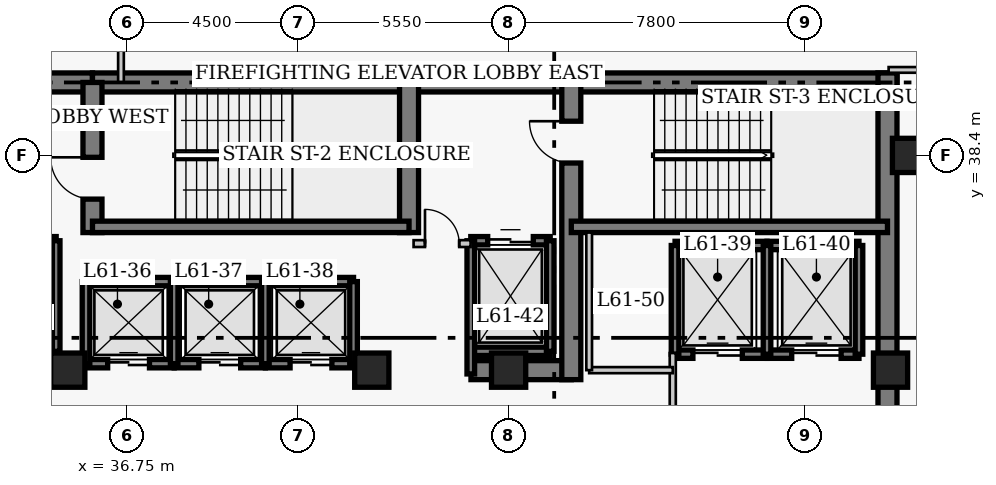
"""IFC4 building model, lengths in metres.
Left out: names, types, materials, properties, quantities, classifications, styles, units other than length and angle.
Written with IfcOpenShell. Run it as: python <this file> out.ifc"""

import sys

from ifc_helpers import new_model, si_unit, direction, frame, frame_2d, origin, origin_2d, place, context, subcontext, project, spatial, rectangle, extrude, element, fill, save


model = new_model("IFC4")
c1 = context("Model", 3, precision=1e-05, world=origin(), true_north=direction((0.0, 1.0)))
c2 = subcontext(c1, "Body", "Model", "MODEL_VIEW")
j1 = project(units=[si_unit("LENGTHUNIT", "METRE"), si_unit("PLANEANGLEUNIT", "RADIAN")], contexts=[c1])
p1 = place(None, origin())
s1 = spatial("IfcSite", under=j1, at=p1, CompositionType="ELEMENT")
p2 = place(p1, origin())
s2 = spatial("IfcBuilding", under=s1, at=p2, CompositionType="ELEMENT")
p3 = place(p2, frame((0.0, 0.0, 245.4)))
s3 = spatial("IfcBuildingStorey", under=s2, at=p3, CompositionType="ELEMENT", Elevation=245.4)
p4 = place(p3, frame((21.65, 40.32, 0.0), z_axis=(0.0, 0.0, 1.0), x_axis=(1.0, 0.0, 0.0)))
e1 = element("IfcWall", 1, at=p4, inside=s3, PredefinedType="SHEAR", context=c2, shape_type="SweptSolid", body=[
    extrude(rectangle(XDim=14.2, YDim=0.5, at=frame_2d((7.1, 0.0))), origin(), (0.0, 0.0, 1.0), 4.0),
])
p5 = place(p3, frame((35.85, 40.32, 0.0), z_axis=(0.0, 0.0, 1.0), x_axis=(1.0, 0.0, 0.0)))
e2 = element("IfcWall", 2, at=p5, inside=s3, PredefinedType="SHEAR", context=c2, shape_type="SweptSolid", body=[
    extrude(rectangle(XDim=12.6, YDim=0.5, at=frame_2d((6.3, 0.0))), origin(), (0.0, 0.0, 1.0), 4.0),
])
p6 = place(p3, frame((48.45, 40.32, 0.0), z_axis=(0.0, 0.0, 1.0), x_axis=(1.0, 0.0, 0.0)))
e3 = element("IfcWall", 3, at=p6, inside=s3, PredefinedType="SHEAR", context=c2, shape_type="SweptSolid", body=[
    extrude(rectangle(XDim=8.57, YDim=0.5, at=frame_2d((4.285, 0.0))), origin(), (0.0, 0.0, 1.0), 4.0),
])
p7 = place(p3, frame((56.77, 27.05, 0.0), z_axis=(0.0, 0.0, 1.0), x_axis=(0.0, 1.0, 0.0)))
e4 = element("IfcWall", 4, at=p7, inside=s3, PredefinedType="SHEAR", context=c2, shape_type="SweptSolid", body=[
    extrude(rectangle(XDim=13.52, YDim=0.5, at=frame_2d((6.76, 0.0))), origin(), (0.0, 0.0, 1.0), 4.0),
])
p8 = place(p3, frame((45.81, 32.75, 0.0), z_axis=(0.0, 0.0, 1.0), x_axis=(1.0, 0.0, 0.0)))
e5 = element("IfcWall", 5, at=p8, inside=s3, PredefinedType="SHEAR", context=c2, shape_type="SweptSolid", body=[
    extrude(rectangle(XDim=2.64, YDim=0.5, at=frame_2d((1.32, 0.0))), origin(), (0.0, 0.0, 1.0), 4.0),
])
p9 = place(p3, frame((35.85, 36.37, 0.0), z_axis=(0.0, 0.0, 1.0), x_axis=(0.0, 1.0, 0.0)))
e6 = element("IfcWall", 6, at=p9, inside=s3, PredefinedType="SHEAR", context=c2, shape_type="SweptSolid", body=[
    extrude(rectangle(XDim=3.95, YDim=0.5, at=frame_2d((1.975, 0.0))), origin(), (0.0, 0.0, 1.0), 4.0),
])
p10 = place(p9, frame((0.88, 0.0, 0.0)))
e7 = element("IfcOpeningElement", 7, at=p10, cuts=e6, PredefinedType="OPENING", context=c2, shape_type="SweptSolid", body=[
    extrude(rectangle(XDim=1.1, YDim=2.15, at=frame_2d((0.55, 1.075))), frame((0.0, 0.26, 0.0), z_axis=(0.0, -1.0, 0.0), x_axis=(1.0, 0.0, 0.0)), (0.0, 0.0, 1.0), 0.52),
])
p11 = place(p3, frame((44.18, 36.37, 0.0), z_axis=(0.0, 0.0, 1.0), x_axis=(0.0, 1.0, 0.0)))
e8 = element("IfcWall", 8, at=p11, inside=s3, PredefinedType="SHEAR", context=c2, shape_type="SweptSolid", body=[
    extrude(rectangle(XDim=3.95, YDim=0.5, at=frame_2d((1.975, 0.0))), origin(), (0.0, 0.0, 1.0), 4.0),
])
p12 = place(p3, frame((48.45, 32.5, 0.0), z_axis=(0.0, 0.0, 1.0), x_axis=(0.0, 1.0, 0.0)))
e9 = element("IfcWall", 9, at=p12, inside=s3, PredefinedType="SHEAR", context=c2, shape_type="SweptSolid", body=[
    extrude(rectangle(XDim=7.82, YDim=0.5, at=frame_2d((3.91, 0.0))), origin(), (0.0, 0.0, 1.0), 4.0),
])
p13 = place(p12, frame((5.7, 0.0, 0.0)))
e10 = element("IfcOpeningElement", 10, at=p13, cuts=e9, PredefinedType="OPENING", context=c2, shape_type="SweptSolid", body=[
    extrude(rectangle(XDim=1.1, YDim=2.15, at=frame_2d((0.55, 1.075))), frame((0.0, 0.26, 0.0), z_axis=(0.0, -1.0, 0.0), x_axis=(1.0, 0.0, 0.0)), (0.0, 0.0, 1.0), 0.52),
])
p14 = place(p3, frame((35.85, 36.52, 0.0), z_axis=(0.0, 0.0, 1.0), x_axis=(1.0, 0.0, 0.0)))
e11 = element("IfcWall", 11, at=p14, inside=s3, PredefinedType="SHEAR", context=c2, shape_type="SweptSolid", body=[
    extrude(rectangle(XDim=8.33, YDim=0.3, at=frame_2d((4.165, 0.0))), origin(), (0.0, 0.0, 1.0), 4.0),
])
p15 = place(p3, frame((48.45, 36.52, 0.0), z_axis=(0.0, 0.0, 1.0), x_axis=(1.0, 0.0, 0.0)))
e12 = element("IfcWall", 12, at=p15, inside=s3, PredefinedType="SHEAR", context=c2, shape_type="SweptSolid", body=[
    extrude(rectangle(XDim=8.32, YDim=0.3, at=frame_2d((4.16, 0.0))), origin(), (0.0, 0.0, 1.0), 4.0),
])
for number, where, z_axis, x_axis in (
    (13, (57.35, 38.4, 0.0), (0.0, 0.0, 1.0), (1.0, 0.0, 0.0)),
    (14, (35.2, 32.75, 0.0), (0.0, 0.0, 1.0), (1.0, 0.0, 0.0)),
    (15, (43.2, 32.75, 0.0), (0.0, 0.0, 1.0), (1.0, 0.0, 0.0)),
    (16, (46.8, 32.75, 0.0), (0.0, 0.0, 1.0), (1.0, 0.0, 0.0)),
    (17, (56.85, 32.75, 0.0), (0.0, 0.0, 1.0), (1.0, 0.0, 0.0)),
):
    element("IfcColumn", number, at=place(p3, frame(where, z_axis=z_axis, x_axis=x_axis)), inside=s3, PredefinedType="COLUMN", context=c2, shape_type="SweptSolid", body=[
        extrude(rectangle(XDim=0.9, YDim=0.9, at=origin_2d()), origin(), (0.0, 0.0, 1.0), 4.0),
    ])
p16 = place(p3, frame((35.68, 35.08, 0.0), z_axis=(0.0, 0.0, 1.0), x_axis=(1.0, 0.0, 0.0)))
e18 = element("IfcWall", 18, at=p16, inside=s3, PredefinedType="SHEAR", context=c2, shape_type="SweptSolid", body=[
    extrude(rectangle(XDim=2.32, YDim=0.22, at=frame_2d((1.16, 0.0))), origin(), (0.0, 0.0, 1.0), 4.0),
])
p17 = place(p3, frame((35.68, 32.92, 0.0), z_axis=(0.0, 0.0, 1.0), x_axis=(1.0, 0.0, 0.0)))
e19 = element("IfcWall", 19, at=p17, inside=s3, PredefinedType="SHEAR", context=c2, shape_type="SweptSolid", body=[
    extrude(rectangle(XDim=2.32, YDim=0.22, at=frame_2d((1.16, 0.0))), origin(), (0.0, 0.0, 1.0), 4.0),
])
p18 = place(p17, frame((0.57, 0.0, 0.0)))
e20 = element("IfcOpeningElement", 20, at=p18, cuts=e19, PredefinedType="OPENING", context=c2, shape_type="SweptSolid", body=[
    extrude(rectangle(XDim=1.1, YDim=2.15, at=frame_2d((0.55, 1.075))), frame((0.0, 0.12, 0.0), z_axis=(0.0, -1.0, 0.0), x_axis=(1.0, 0.0, 0.0)), (0.0, 0.0, 1.0), 0.24),
])
p19 = place(p3, frame((35.68, 32.92, 0.0), z_axis=(0.0, 0.0, 1.0), x_axis=(0.0, 1.0, 0.0)))
e21 = element("IfcWall", 21, at=p19, inside=s3, PredefinedType="SHEAR", context=c2, shape_type="SweptSolid", body=[
    extrude(rectangle(XDim=2.16, YDim=0.2, at=frame_2d((1.08, 0.0))), origin(), (0.0, 0.0, 1.0), 4.0),
])
p20 = place(p3, frame((38.0, 35.08, 0.0), z_axis=(0.0, 0.0, 1.0), x_axis=(1.0, 0.0, 0.0)))
e22 = element("IfcWall", 22, at=p20, inside=s3, PredefinedType="SHEAR", context=c2, shape_type="SweptSolid", body=[
    extrude(rectangle(XDim=2.4, YDim=0.22, at=frame_2d((1.2, 0.0))), origin(), (0.0, 0.0, 1.0), 4.0),
])
p21 = place(p3, frame((38.0, 32.92, 0.0), z_axis=(0.0, 0.0, 1.0), x_axis=(1.0, 0.0, 0.0)))
e23 = element("IfcWall", 23, at=p21, inside=s3, PredefinedType="SHEAR", context=c2, shape_type="SweptSolid", body=[
    extrude(rectangle(XDim=2.4, YDim=0.22, at=frame_2d((1.2, 0.0))), origin(), (0.0, 0.0, 1.0), 4.0),
])
p22 = place(p21, frame((0.65, 0.0, 0.0)))
e24 = element("IfcOpeningElement", 24, at=p22, cuts=e23, PredefinedType="OPENING", context=c2, shape_type="SweptSolid", body=[
    extrude(rectangle(XDim=1.1, YDim=2.15, at=frame_2d((0.55, 1.075))), frame((0.0, 0.12, 0.0), z_axis=(0.0, -1.0, 0.0), x_axis=(1.0, 0.0, 0.0)), (0.0, 0.0, 1.0), 0.24),
])
p23 = place(p3, frame((38.0, 32.92, 0.0), z_axis=(0.0, 0.0, 1.0), x_axis=(0.0, 1.0, 0.0)))
e25 = element("IfcWall", 25, at=p23, inside=s3, PredefinedType="SHEAR", context=c2, shape_type="SweptSolid", body=[
    extrude(rectangle(XDim=2.16, YDim=0.2, at=frame_2d((1.08, 0.0))), origin(), (0.0, 0.0, 1.0), 4.0),
])
p24 = place(p3, frame((40.4, 35.08, 0.0), z_axis=(0.0, 0.0, 1.0), x_axis=(1.0, 0.0, 0.0)))
e26 = element("IfcWall", 26, at=p24, inside=s3, PredefinedType="SHEAR", context=c2, shape_type="SweptSolid", body=[
    extrude(rectangle(XDim=2.32, YDim=0.22, at=frame_2d((1.16, 0.0))), origin(), (0.0, 0.0, 1.0), 4.0),
])
p25 = place(p3, frame((40.4, 32.92, 0.0), z_axis=(0.0, 0.0, 1.0), x_axis=(1.0, 0.0, 0.0)))
e27 = element("IfcWall", 27, at=p25, inside=s3, PredefinedType="SHEAR", context=c2, shape_type="SweptSolid", body=[
    extrude(rectangle(XDim=2.32, YDim=0.22, at=frame_2d((1.16, 0.0))), origin(), (0.0, 0.0, 1.0), 4.0),
])
p26 = place(p25, frame((0.65, 0.0, 0.0)))
e28 = element("IfcOpeningElement", 28, at=p26, cuts=e27, PredefinedType="OPENING", context=c2, shape_type="SweptSolid", body=[
    extrude(rectangle(XDim=1.1, YDim=2.15, at=frame_2d((0.55, 1.075))), frame((0.0, 0.12, 0.0), z_axis=(0.0, -1.0, 0.0), x_axis=(1.0, 0.0, 0.0)), (0.0, 0.0, 1.0), 0.24),
])
for number, where, z_axis, x_axis in (
    (29, (40.4, 32.92, 0.0), (0.0, 0.0, 1.0), (0.0, 1.0, 0.0)),
    (30, (42.72, 32.92, 0.0), (0.0, 0.0, 1.0), (0.0, 1.0, 0.0)),
):
    element("IfcWall", number, at=place(p3, frame(where, z_axis=z_axis, x_axis=x_axis)), inside=s3, PredefinedType="SHEAR", context=c2, shape_type="SweptSolid", body=[
        extrude(rectangle(XDim=2.16, YDim=0.2, at=frame_2d((1.08, 0.0))), origin(), (0.0, 0.0, 1.0), 4.0),
    ])
p27 = place(p3, frame((51.18, 36.03, 0.0), z_axis=(0.0, 0.0, 1.0), x_axis=(1.0, 0.0, 0.0)))
e31 = element("IfcWall", 31, at=p27, inside=s3, PredefinedType="SHEAR", context=c2, shape_type="SweptSolid", body=[
    extrude(rectangle(XDim=2.42, YDim=0.22, at=frame_2d((1.21, 0.0))), origin(), (0.0, 0.0, 1.0), 4.0),
])
p28 = place(p3, frame((51.18, 33.17, 0.0), z_axis=(0.0, 0.0, 1.0), x_axis=(1.0, 0.0, 0.0)))
e32 = element("IfcWall", 32, at=p28, inside=s3, PredefinedType="SHEAR", context=c2, shape_type="SweptSolid", body=[
    extrude(rectangle(XDim=2.42, YDim=0.22, at=frame_2d((1.21, 0.0))), origin(), (0.0, 0.0, 1.0), 4.0),
])
p29 = place(p28, frame((0.47, 0.0, 0.0)))
e33 = element("IfcOpeningElement", 33, at=p29, cuts=e32, PredefinedType="OPENING", context=c2, shape_type="SweptSolid", body=[
    extrude(rectangle(XDim=1.3, YDim=2.15, at=frame_2d((0.65, 1.075))), frame((0.0, 0.12, 0.0), z_axis=(0.0, -1.0, 0.0), x_axis=(1.0, 0.0, 0.0)), (0.0, 0.0, 1.0), 0.24),
])
p30 = place(p3, frame((51.18, 33.17, 0.0), z_axis=(0.0, 0.0, 1.0), x_axis=(0.0, 1.0, 0.0)))
e34 = element("IfcWall", 34, at=p30, inside=s3, PredefinedType="SHEAR", context=c2, shape_type="SweptSolid", body=[
    extrude(rectangle(XDim=2.86, YDim=0.2, at=frame_2d((1.43, 0.0))), origin(), (0.0, 0.0, 1.0), 4.0),
])
p31 = place(p3, frame((53.6, 36.03, 0.0), z_axis=(0.0, 0.0, 1.0), x_axis=(1.0, 0.0, 0.0)))
e35 = element("IfcWall", 35, at=p31, inside=s3, PredefinedType="SHEAR", context=c2, shape_type="SweptSolid", body=[
    extrude(rectangle(XDim=2.42, YDim=0.22, at=frame_2d((1.21, 0.0))), origin(), (0.0, 0.0, 1.0), 4.0),
])
p32 = place(p3, frame((53.6, 33.17, 0.0), z_axis=(0.0, 0.0, 1.0), x_axis=(1.0, 0.0, 0.0)))
e36 = element("IfcWall", 36, at=p32, inside=s3, PredefinedType="SHEAR", context=c2, shape_type="SweptSolid", body=[
    extrude(rectangle(XDim=2.42, YDim=0.22, at=frame_2d((1.21, 0.0))), origin(), (0.0, 0.0, 1.0), 4.0),
])
p33 = place(p32, frame((0.65, 0.0, 0.0)))
e37 = element("IfcOpeningElement", 37, at=p33, cuts=e36, PredefinedType="OPENING", context=c2, shape_type="SweptSolid", body=[
    extrude(rectangle(XDim=1.3, YDim=2.15, at=frame_2d((0.65, 1.075))), frame((0.0, 0.12, 0.0), z_axis=(0.0, -1.0, 0.0), x_axis=(1.0, 0.0, 0.0)), (0.0, 0.0, 1.0), 0.24),
])
for number, where, z_axis, x_axis in (
    (38, (53.6, 33.17, 0.0), (0.0, 0.0, 1.0), (0.0, 1.0, 0.0)),
    (39, (56.02, 33.17, 0.0), (0.0, 0.0, 1.0), (0.0, 1.0, 0.0)),
):
    element("IfcWall", number, at=place(p3, frame(where, z_axis=z_axis, x_axis=x_axis)), inside=s3, PredefinedType="SHEAR", context=c2, shape_type="SweptSolid", body=[
        extrude(rectangle(XDim=2.86, YDim=0.2, at=frame_2d((1.43, 0.0))), origin(), (0.0, 0.0, 1.0), 4.0),
    ])
p34 = place(p3, frame((32.805, 36.155, 0.0), z_axis=(0.0, 0.0, 1.0), x_axis=(1.0, 0.0, 0.0)))
e40 = element("IfcWall", 40, at=p34, inside=s3, PredefinedType="SHEAR", context=c2, shape_type="SweptSolid", body=[
    extrude(rectangle(XDim=2.09, YDim=0.22, at=frame_2d((1.045, 0.0))), origin(), (0.0, 0.0, 1.0), 4.0),
])
p35 = place(p34, frame((0.445, 0.0, 0.0)))
e41 = element("IfcOpeningElement", 41, at=p35, cuts=e40, PredefinedType="OPENING", context=c2, shape_type="SweptSolid", body=[
    extrude(rectangle(XDim=1.2, YDim=2.15, at=frame_2d((0.6, 1.075))), frame((0.0, 0.12, 0.0), z_axis=(0.0, -1.0, 0.0), x_axis=(1.0, 0.0, 0.0)), (0.0, 0.0, 1.0), 0.24),
])
p36 = place(p3, frame((32.805, 33.245, 0.0), z_axis=(0.0, 0.0, 1.0), x_axis=(1.0, 0.0, 0.0)))
e42 = element("IfcWall", 42, at=p36, inside=s3, PredefinedType="SHEAR", context=c2, shape_type="SweptSolid", body=[
    extrude(rectangle(XDim=2.09, YDim=0.22, at=frame_2d((1.045, 0.0))), origin(), (0.0, 0.0, 1.0), 4.0),
])
p37 = place(p3, frame((34.895, 33.245, 0.0), z_axis=(0.0, 0.0, 1.0), x_axis=(0.0, 1.0, 0.0)))
e43 = element("IfcWall", 43, at=p37, inside=s3, PredefinedType="SHEAR", context=c2, shape_type="SweptSolid", body=[
    extrude(rectangle(XDim=2.91, YDim=0.2, at=frame_2d((1.455, 0.0))), origin(), (0.0, 0.0, 1.0), 4.0),
])
p38 = place(p3, frame((45.805, 36.155, 0.0), z_axis=(0.0, 0.0, 1.0), x_axis=(1.0, 0.0, 0.0)))
e44 = element("IfcWall", 44, at=p38, inside=s3, PredefinedType="SHEAR", context=c2, shape_type="SweptSolid", body=[
    extrude(rectangle(XDim=2.09, YDim=0.22, at=frame_2d((1.045, 0.0))), origin(), (0.0, 0.0, 1.0), 4.0),
])
p39 = place(p38, frame((0.445, 0.0, 0.0)))
e45 = element("IfcOpeningElement", 45, at=p39, cuts=e44, PredefinedType="OPENING", context=c2, shape_type="SweptSolid", body=[
    extrude(rectangle(XDim=1.2, YDim=2.15, at=frame_2d((0.6, 1.075))), frame((0.0, 0.12, 0.0), z_axis=(0.0, -1.0, 0.0), x_axis=(1.0, 0.0, 0.0)), (0.0, 0.0, 1.0), 0.24),
])
p40 = place(p3, frame((45.805, 33.245, 0.0), z_axis=(0.0, 0.0, 1.0), x_axis=(1.0, 0.0, 0.0)))
e46 = element("IfcWall", 46, at=p40, inside=s3, PredefinedType="SHEAR", context=c2, shape_type="SweptSolid", body=[
    extrude(rectangle(XDim=2.09, YDim=0.22, at=frame_2d((1.045, 0.0))), origin(), (0.0, 0.0, 1.0), 4.0),
])
p41 = place(p3, frame((45.805, 32.65, 0.0), z_axis=(0.0, 0.0, 1.0), x_axis=(0.0, 1.0, 0.0)))
e47 = element("IfcWall", 47, at=p41, inside=s3, PredefinedType="SHEAR", context=c2, shape_type="SweptSolid", body=[
    extrude(rectangle(XDim=3.505, YDim=0.2, at=frame_2d((1.752, 0.0))), origin(), (0.0, 0.0, 1.0), 4.0),
])
p42 = place(p3, frame((47.895, 33.245, 0.0), z_axis=(0.0, 0.0, 1.0), x_axis=(0.0, 1.0, 0.0)))
e48 = element("IfcWall", 48, at=p42, inside=s3, PredefinedType="SHEAR", context=c2, shape_type="SweptSolid", body=[
    extrude(rectangle(XDim=2.91, YDim=0.2, at=frame_2d((1.455, 0.0))), origin(), (0.0, 0.0, 1.0), 4.0),
])
p43 = place(p3, frame((44.3, 36.08, 0.0), z_axis=(0.0, 0.0, 1.0), x_axis=(1.0, 0.0, 0.0)))
e49 = element("IfcWall", 49, at=p43, inside=s3, PredefinedType="PARTITIONING", context=c2, shape_type="SweptSolid", body=[
    extrude(rectangle(XDim=1.5, YDim=0.18, at=frame_2d((0.75, 0.0))), origin(), (0.0, 0.0, 1.0), 3.76),
])
p44 = place(p43, frame((0.3, 0.0, 0.0)))
e50 = element("IfcOpeningElement", 50, at=p44, cuts=e49, PredefinedType="OPENING", context=c2, shape_type="SweptSolid", body=[
    extrude(rectangle(XDim=0.9, YDim=2.15, at=frame_2d((0.45, 1.075))), frame((0.0, 0.1, 0.0), z_axis=(0.0, -1.0, 0.0), x_axis=(1.0, 0.0, 0.0)), (0.0, 0.0, 1.0), 0.2),
])
p45 = place(p3, frame((51.12, 29.5, 0.0), z_axis=(0.0, 0.0, 1.0), x_axis=(0.0, 1.0, 0.0)))
e51 = element("IfcWall", 51, at=p45, inside=s3, PredefinedType="PARTITIONING", context=c2, shape_type="SweptSolid", body=[
    extrude(rectangle(XDim=3.7, YDim=0.16, at=frame_2d((1.85, 0.0))), origin(), (0.0, 0.0, 1.0), 3.76),
])
p46 = place(p45, frame((0.9, 0.0, 0.0)))
e52 = element("IfcOpeningElement", 52, at=p46, cuts=e51, PredefinedType="OPENING", context=c2, shape_type="SweptSolid", body=[
    extrude(rectangle(XDim=1.1, YDim=2.15, at=frame_2d((0.55, 1.075))), frame((0.0, 0.09, 0.0), z_axis=(0.0, -1.0, 0.0), x_axis=(1.0, 0.0, 0.0)), (0.0, 0.0, 1.0), 0.18),
])
p47 = place(p3, frame((48.92, 32.75, 0.0), z_axis=(0.0, 0.0, 1.0), x_axis=(1.0, 0.0, 0.0)))
e53 = element("IfcWall", 53, at=p47, inside=s3, PredefinedType="PARTITIONING", context=c2, shape_type="SweptSolid", body=[
    extrude(rectangle(XDim=2.2, YDim=0.16, at=frame_2d((1.1, 0.0))), origin(), (0.0, 0.0, 1.0), 3.76),
])
p48 = place(p3, frame((48.92, 32.75, 0.0), z_axis=(0.0, 0.0, 1.0), x_axis=(0.0, 1.0, 0.0)))
e54 = element("IfcWall", 54, at=p48, inside=s3, PredefinedType="PARTITIONING", context=c2, shape_type="SweptSolid", body=[
    extrude(rectangle(XDim=3.62, YDim=0.15, at=frame_2d((1.81, 0.0))), origin(), (0.0, 0.0, 1.0), 3.76),
])
p49 = place(p3, frame((56.8, 40.65, 0.0), z_axis=(0.0, 0.0, 1.0), x_axis=(1.0, 0.0, 0.0)))
e55 = element("IfcWall", 55, at=p49, inside=s3, PredefinedType="PARTITIONING", context=c2, shape_type="SweptSolid", body=[
    extrude(rectangle(XDim=4.66, YDim=0.15, at=frame_2d((2.33, 0.0))), origin(), (0.0, 0.0, 1.0), 3.76),
])
p50 = place(p49, frame((3.05, 0.0, 0.0)))
e56 = element("IfcOpeningElement", 56, at=p50, cuts=e55, PredefinedType="OPENING", context=c2, shape_type="SweptSolid", body=[
    extrude(rectangle(XDim=1.0, YDim=2.15, at=frame_2d((0.5, 1.075))), frame((0.0, 0.085, 0.0), z_axis=(0.0, -1.0, 0.0), x_axis=(1.0, 0.0, 0.0)), (0.0, 0.0, 1.0), 0.17),
])
p51 = place(p3, frame((36.6, 40.32, 0.0), z_axis=(0.0, 0.0, 1.0), x_axis=(0.0, 1.0, 0.0)))
e57 = element("IfcWall", 57, at=p51, inside=s3, PredefinedType="PARTITIONING", context=c2, shape_type="SweptSolid", body=[
    extrude(rectangle(XDim=3.545, YDim=0.15, at=frame_2d((1.772, 0.0))), origin(), (0.0, 0.0, 1.0), 3.76),
])
p52 = place(p18, origin())
e58 = element("IfcDoor", 58, at=p52, inside=s3, OperationType="DOUBLE_DOOR_SLIDING", PredefinedType="DOOR", context=c2, shape_type="SweptSolid", body=[
    extrude(rectangle(XDim=1.1, YDim=2.15, at=frame_2d((0.55, 1.075))), frame((0.0, 0.025, 0.0), z_axis=(0.0, -1.0, 0.0), x_axis=(1.0, 0.0, 0.0)), (0.0, 0.0, 1.0), 0.05),
])
fill(e20, e58)
p53 = place(p22, origin())
e59 = element("IfcDoor", 59, at=p53, inside=s3, OperationType="DOUBLE_DOOR_SLIDING", PredefinedType="DOOR", context=c2, shape_type="SweptSolid", body=[
    extrude(rectangle(XDim=1.1, YDim=2.15, at=frame_2d((0.55, 1.075))), frame((0.0, 0.025, 0.0), z_axis=(0.0, -1.0, 0.0), x_axis=(1.0, 0.0, 0.0)), (0.0, 0.0, 1.0), 0.05),
])
fill(e24, e59)
p54 = place(p26, origin())
e60 = element("IfcDoor", 60, at=p54, inside=s3, OperationType="DOUBLE_DOOR_SLIDING", PredefinedType="DOOR", context=c2, shape_type="SweptSolid", body=[
    extrude(rectangle(XDim=1.1, YDim=2.15, at=frame_2d((0.55, 1.075))), frame((0.0, 0.025, 0.0), z_axis=(0.0, -1.0, 0.0), x_axis=(1.0, 0.0, 0.0)), (0.0, 0.0, 1.0), 0.05),
])
fill(e28, e60)
p55 = place(p29, origin())
e61 = element("IfcDoor", 61, at=p55, inside=s3, OperationType="DOUBLE_DOOR_SLIDING", PredefinedType="DOOR", context=c2, shape_type="SweptSolid", body=[
    extrude(rectangle(XDim=1.3, YDim=2.15, at=frame_2d((0.65, 1.075))), frame((0.0, 0.025, 0.0), z_axis=(0.0, -1.0, 0.0), x_axis=(1.0, 0.0, 0.0)), (0.0, 0.0, 1.0), 0.05),
])
fill(e33, e61)
p56 = place(p33, origin())
e62 = element("IfcDoor", 62, at=p56, inside=s3, OperationType="DOUBLE_DOOR_SLIDING", PredefinedType="DOOR", context=c2, shape_type="SweptSolid", body=[
    extrude(rectangle(XDim=1.3, YDim=2.15, at=frame_2d((0.65, 1.075))), frame((0.0, 0.025, 0.0), z_axis=(0.0, -1.0, 0.0), x_axis=(1.0, 0.0, 0.0)), (0.0, 0.0, 1.0), 0.05),
])
fill(e37, e62)
p57 = place(p39, origin())
e63 = element("IfcDoor", 63, at=p57, inside=s3, OperationType="DOUBLE_DOOR_SLIDING", PredefinedType="DOOR", context=c2, shape_type="SweptSolid", body=[
    extrude(rectangle(XDim=1.2, YDim=2.15, at=frame_2d((0.6, 1.075))), frame((0.0, 0.025, 0.0), z_axis=(0.0, -1.0, 0.0), x_axis=(1.0, 0.0, 0.0)), (0.0, 0.0, 1.0), 0.05),
])
fill(e45, e63)
p58 = place(p44, origin())
e64 = element("IfcDoor", 64, at=p58, inside=s3, OperationType="SINGLE_SWING_LEFT", PredefinedType="DOOR", context=c2, shape_type="SweptSolid", body=[
    extrude(rectangle(XDim=0.9, YDim=2.15, at=frame_2d((0.45, 1.075))), frame((0.0, 0.025, 0.0), z_axis=(0.0, -1.0, 0.0), x_axis=(1.0, 0.0, 0.0)), (0.0, 0.0, 1.0), 0.05),
])
fill(e50, e64)
p59 = place(p10, origin())
e65 = element("IfcDoor", 65, at=p59, inside=s3, OperationType="SINGLE_SWING_RIGHT", PredefinedType="DOOR", context=c2, shape_type="SweptSolid", body=[
    extrude(rectangle(XDim=1.1, YDim=2.15, at=frame_2d((0.55, 1.075))), frame((0.0, 0.025, 0.0), z_axis=(0.0, -1.0, 0.0), x_axis=(1.0, 0.0, 0.0)), (0.0, 0.0, 1.0), 0.05),
])
fill(e7, e65)
p60 = place(p13, origin())
e66 = element("IfcDoor", 66, at=p60, inside=s3, OperationType="SINGLE_SWING_RIGHT", PredefinedType="DOOR", context=c2, shape_type="SweptSolid", body=[
    extrude(rectangle(XDim=1.1, YDim=2.15, at=frame_2d((0.55, 1.075))), frame((0.0, 0.025, 0.0), z_axis=(0.0, -1.0, 0.0), x_axis=(1.0, 0.0, 0.0)), (0.0, 0.0, 1.0), 0.05),
])
fill(e10, e66)
save(model, sys.argv[1])
